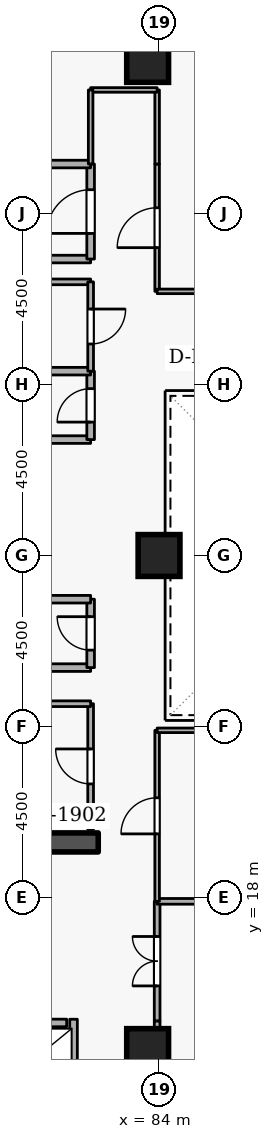
"""IFC4 building model, lengths in metres.
Left out: names, types, materials, properties, quantities, classifications, styles, units other than length and angle.
Written with IfcOpenShell. Run it as: python <this file> out.ifc"""

import sys

from ifc_helpers import new_model, si_unit, direction, frame, frame_2d, origin, origin_2d, place, context, subcontext, project, spatial, rectangle, extrude, element, fill, save


model = new_model("IFC4")
c1 = context("Model", 3, precision=1e-05, world=origin(), true_north=direction((0.0, 1.0)))
c2 = subcontext(c1, "Body", "Model", "MODEL_VIEW")
j1 = project(units=[si_unit("LENGTHUNIT", "METRE"), si_unit("PLANEANGLEUNIT", "RADIAN")], contexts=[c1])
p1 = place(None, origin())
s1 = spatial("IfcSite", under=j1, at=p1, CompositionType="ELEMENT")
p2 = place(p1, origin())
s2 = spatial("IfcBuilding", under=s1, at=p2, CompositionType="ELEMENT")
p3 = place(p2, frame((0.0, 0.0, 159.9)))
s3 = spatial("IfcBuildingStorey", under=s2, at=p3, CompositionType="ELEMENT", Elevation=159.9)
p4 = place(p3, frame((76.6, 19.45, 0.0), z_axis=(0.0, 0.0, 1.0), x_axis=(1.0, 0.0, 0.0)))
e1 = element("IfcWall", 1, at=p4, inside=s3, PredefinedType="SHEAR", context=c2, shape_type="SweptSolid", body=[
    extrude(rectangle(XDim=5.8, YDim=0.5, at=frame_2d((2.9, 0.0))), origin(), (0.0, 0.0, 1.0), 3.6),
])
for number, where, z_axis, x_axis in (
    (2, (83.7, 14.0, 0.0), (0.0, 0.0, 1.0), (1.0, 0.0, 0.0)),
    (3, (83.7, 40.0, 0.0), (0.0, 0.0, 1.0), (1.0, 0.0, 0.0)),
    (4, (84.0, 27.0, 0.0), (0.0, 0.0, 1.0), (1.0, 0.0, 0.0)),
):
    element("IfcColumn", number, at=place(p3, frame(where, z_axis=z_axis, x_axis=x_axis)), inside=s3, PredefinedType="COLUMN", context=c2, shape_type="SweptSolid", body=[
        extrude(rectangle(XDim=1.1, YDim=1.1, at=origin_2d()), origin(), (0.0, 0.0, 1.0), 3.6),
    ])
p5 = place(p3, frame((79.63, 14.7, 0.0), z_axis=(0.0, 0.0, 1.0), x_axis=(1.0, 0.0, 0.0)))
e5 = element("IfcWall", 5, at=p5, inside=s3, PredefinedType="STANDARD", context=c2, shape_type="SweptSolid", body=[
    extrude(rectangle(XDim=1.94, YDim=0.2, at=frame_2d((0.97, 0.0))), origin(), (0.0, 0.0, 1.0), 3.34),
])
p6 = place(p5, frame((0.46, 0.0, 0.0)))
e6 = element("IfcOpeningElement", 6, at=p6, cuts=e5, PredefinedType="OPENING", context=c2, shape_type="SweptSolid", body=[
    extrude(rectangle(XDim=1.02, YDim=2.06, at=frame_2d((0.51, 1.03))), frame((0.0, 0.11, 0.0), z_axis=(0.0, -1.0, 0.0), x_axis=(1.0, 0.0, 0.0)), (0.0, 0.0, 1.0), 0.22),
])
p7 = place(p3, frame((81.75, 12.612, 0.0), z_axis=(0.0, 0.0, 1.0), x_axis=(0.0, 1.0, 0.0)))
e7 = element("IfcWall", 7, at=p7, inside=s3, PredefinedType="STANDARD", context=c2, shape_type="SweptSolid", body=[
    extrude(rectangle(XDim=2.186, YDim=0.2, at=frame_2d((1.093, 0.0))), origin(), (0.0, 0.0, 1.0), 3.34),
])
p8 = place(p3, frame((79.9, 34.8, 0.0), z_axis=(0.0, 0.0, 1.0), x_axis=(1.0, 0.0, 0.0)))
e8 = element("IfcWall", 8, at=p8, inside=s3, PredefinedType="STANDARD", context=c2, shape_type="SweptSolid", body=[
    extrude(rectangle(XDim=2.3, YDim=0.2, at=frame_2d((1.15, 0.0))), origin(), (0.0, 0.0, 1.0), 2.545),
])
p9 = place(p3, frame((82.2, 34.8, 0.0), z_axis=(0.0, 0.0, 1.0), x_axis=(0.0, 1.0, 0.0)))
e9 = element("IfcWall", 9, at=p9, inside=s3, PredefinedType="STANDARD", context=c2, shape_type="SweptSolid", body=[
    extrude(rectangle(XDim=2.5, YDim=0.2, at=frame_2d((1.25, 0.0))), origin(), (0.0, 0.0, 1.0), 3.34),
])
p10 = place(p9, frame((0.675, 0.0, 0.0)))
e10 = element("IfcOpeningElement", 10, at=p10, cuts=e9, PredefinedType="OPENING", context=c2, shape_type="SweptSolid", body=[
    extrude(rectangle(XDim=1.15, YDim=2.1, at=frame_2d((0.575, 1.05))), frame((0.0, 0.11, 0.0), z_axis=(0.0, -1.0, 0.0), x_axis=(1.0, 0.0, 0.0)), (0.0, 0.0, 1.0), 0.22),
])
p11 = place(p3, frame((82.2, 37.3, 0.0), z_axis=(0.0, 0.0, 1.0), x_axis=(-1.0, 0.0, 0.0)))
e11 = element("IfcWall", 11, at=p11, inside=s3, PredefinedType="STANDARD", context=c2, shape_type="SweptSolid", body=[
    extrude(rectangle(XDim=5.7, YDim=0.2, at=frame_2d((2.85, 0.0))), origin(), (0.0, 0.0, 1.0), 3.34),
])
p12 = place(p3, frame((80.15, 24.05, 0.0), z_axis=(0.0, 0.0, 1.0), x_axis=(1.0, 0.0, 0.0)))
e12 = element("IfcWall", 12, at=p12, inside=s3, PredefinedType="STANDARD", context=c2, shape_type="SweptSolid", body=[
    extrude(rectangle(XDim=2.05, YDim=0.2, at=frame_2d((1.025, 0.0))), origin(), (0.0, 0.0, 1.0), 3.34),
])
p13 = place(p3, frame((82.2, 24.05, 0.0), z_axis=(0.0, 0.0, 1.0), x_axis=(0.0, 1.0, 0.0)))
e13 = element("IfcWall", 13, at=p13, inside=s3, PredefinedType="STANDARD", context=c2, shape_type="SweptSolid", body=[
    extrude(rectangle(XDim=1.8, YDim=0.2, at=frame_2d((0.9, 0.0))), origin(), (0.0, 0.0, 1.0), 3.34),
])
p14 = place(p13, frame((0.46, 0.0, 0.0)))
e14 = element("IfcOpeningElement", 14, at=p14, cuts=e13, PredefinedType="OPENING", context=c2, shape_type="SweptSolid", body=[
    extrude(rectangle(XDim=0.88, YDim=2.04, at=frame_2d((0.44, 1.02))), frame((0.0, 0.11, 0.0), z_axis=(0.0, -1.0, 0.0), x_axis=(1.0, 0.0, 0.0)), (0.0, 0.0, 1.0), 0.22),
])
for number, where, z_axis, x_axis in (
    (15, (82.2, 25.85, 0.0), (0.0, 0.0, 1.0), (-1.0, 0.0, 0.0)),
    (16, (80.15, 30.05, 0.0), (0.0, 0.0, 1.0), (1.0, 0.0, 0.0)),
):
    element("IfcWall", number, at=place(p3, frame(where, z_axis=z_axis, x_axis=x_axis)), inside=s3, PredefinedType="STANDARD", context=c2, shape_type="SweptSolid", body=[
        extrude(rectangle(XDim=2.05, YDim=0.2, at=frame_2d((1.025, 0.0))), origin(), (0.0, 0.0, 1.0), 3.34),
    ])
p15 = place(p3, frame((82.2, 30.05, 0.0), z_axis=(0.0, 0.0, 1.0), x_axis=(0.0, 1.0, 0.0)))
e17 = element("IfcWall", 17, at=p15, inside=s3, PredefinedType="STANDARD", context=c2, shape_type="SweptSolid", body=[
    extrude(rectangle(XDim=1.8, YDim=0.2, at=frame_2d((0.9, 0.0))), origin(), (0.0, 0.0, 1.0), 3.34),
])
p16 = place(p15, frame((0.46, 0.0, 0.0)))
e18 = element("IfcOpeningElement", 18, at=p16, cuts=e17, PredefinedType="OPENING", context=c2, shape_type="SweptSolid", body=[
    extrude(rectangle(XDim=0.88, YDim=2.04, at=frame_2d((0.44, 1.02))), frame((0.0, 0.11, 0.0), z_axis=(0.0, -1.0, 0.0), x_axis=(1.0, 0.0, 0.0)), (0.0, 0.0, 1.0), 0.22),
])
p17 = place(p3, frame((82.2, 31.85, 0.0), z_axis=(0.0, 0.0, 1.0), x_axis=(-1.0, 0.0, 0.0)))
e19 = element("IfcWall", 19, at=p17, inside=s3, PredefinedType="STANDARD", context=c2, shape_type="SweptSolid", body=[
    extrude(rectangle(XDim=2.05, YDim=0.2, at=frame_2d((1.025, 0.0))), origin(), (0.0, 0.0, 1.0), 3.34),
])
p18 = place(p3, frame((82.2, 19.8, 0.0), z_axis=(0.0, 0.0, 1.0), x_axis=(0.0, 1.0, 0.0)))
e20 = element("IfcWall", 20, at=p18, inside=s3, PredefinedType="PARTITIONING", context=c2, shape_type="SweptSolid", body=[
    extrude(rectangle(XDim=3.3, YDim=0.15, at=frame_2d((1.65, 0.0))), origin(), (0.0, 0.0, 1.0), 3.34),
])
p19 = place(p18, frame((1.19, 0.0, 0.0)))
e21 = element("IfcOpeningElement", 21, at=p19, cuts=e20, PredefinedType="OPENING", context=c2, shape_type="SweptSolid", body=[
    extrude(rectangle(XDim=0.92, YDim=2.08, at=frame_2d((0.46, 1.04))), frame((0.0, 0.085, 0.0), z_axis=(0.0, -1.0, 0.0), x_axis=(1.0, 0.0, 0.0)), (0.0, 0.0, 1.0), 0.17),
])
p20 = place(p3, frame((82.2, 23.1, 0.0), z_axis=(0.0, 0.0, 1.0), x_axis=(-1.0, 0.0, 0.0)))
e22 = element("IfcWall", 22, at=p20, inside=s3, PredefinedType="PARTITIONING", context=c2, shape_type="SweptSolid", body=[
    extrude(rectangle(XDim=2.05, YDim=0.15, at=frame_2d((1.025, 0.0))), origin(), (0.0, 0.0, 1.0), 3.34),
])
p21 = place(p3, frame((80.15, 34.2, 0.0), z_axis=(0.0, 0.0, 1.0), x_axis=(1.0, 0.0, 0.0)))
e23 = element("IfcWall", 23, at=p21, inside=s3, PredefinedType="PARTITIONING", context=c2, shape_type="SweptSolid", body=[
    extrude(rectangle(XDim=2.05, YDim=0.15, at=frame_2d((1.025, 0.0))), origin(), (0.0, 0.0, 1.0), 2.545),
])
p22 = place(p3, frame((82.2, 34.2, 0.0), z_axis=(0.0, 0.0, 1.0), x_axis=(0.0, -1.0, 0.0)))
e24 = element("IfcWall", 24, at=p22, inside=s3, PredefinedType="PARTITIONING", context=c2, shape_type="SweptSolid", body=[
    extrude(rectangle(XDim=2.35, YDim=0.15, at=frame_2d((1.175, 0.0))), origin(), (0.0, 0.0, 1.0), 3.34),
])
p23 = place(p22, frame((0.715, 0.0, 0.0)))
e25 = element("IfcOpeningElement", 25, at=p23, cuts=e24, PredefinedType="OPENING", context=c2, shape_type="SweptSolid", body=[
    extrude(rectangle(XDim=0.92, YDim=2.08, at=frame_2d((0.46, 1.04))), frame((0.0, 0.085, 0.0), z_axis=(0.0, -1.0, 0.0), x_axis=(1.0, 0.0, 0.0)), (0.0, 0.0, 1.0), 0.17),
])
p24 = place(p3, frame((83.95, 14.75, 0.0), z_axis=(0.0, 0.0, 1.0), x_axis=(0.0, 1.0, 0.0)))
e26 = element("IfcWall", 26, at=p24, inside=s3, PredefinedType="PARTITIONING", context=c2, shape_type="SweptSolid", body=[
    extrude(rectangle(XDim=3.15, YDim=0.15, at=frame_2d((1.575, 0.0))), origin(), (0.0, 0.0, 1.0), 3.34),
])
p25 = place(p24, frame((0.925, 0.0, 0.0)))
e27 = element("IfcOpeningElement", 27, at=p25, cuts=e26, PredefinedType="OPENING", context=c2, shape_type="SweptSolid", body=[
    extrude(rectangle(XDim=1.3, YDim=2.12, at=frame_2d((0.65, 1.06))), frame((0.0, 0.085, 0.0), z_axis=(0.0, -1.0, 0.0), x_axis=(1.0, 0.0, 0.0)), (0.0, 0.0, 1.0), 0.17),
])
p26 = place(p3, frame((83.95, 17.9, 0.0), z_axis=(0.0, 0.0, 1.0), x_axis=(1.0, 0.0, 0.0)))
e28 = element("IfcWall", 28, at=p26, inside=s3, PredefinedType="PARTITIONING", context=c2, shape_type="SweptSolid", body=[
    extrude(rectangle(XDim=4.55, YDim=0.15, at=frame_2d((2.275, 0.0))), origin(), (0.0, 0.0, 1.0), 3.34),
])
p27 = place(p3, frame((83.95, 12.4, 0.0), z_axis=(0.0, 0.0, 1.0), x_axis=(0.0, 1.0, 0.0)))
e29 = element("IfcWall", 29, at=p27, inside=s3, PredefinedType="PARTITIONING", context=c2, shape_type="SweptSolid", body=[
    extrude(rectangle(XDim=2.35, YDim=0.15, at=frame_2d((1.175, 0.0))), origin(), (0.0, 0.0, 1.0), 3.34),
])
p28 = place(p3, frame((83.95, 17.9, 0.0), z_axis=(0.0, 0.0, 1.0), x_axis=(0.0, 1.0, 0.0)))
e30 = element("IfcWall", 30, at=p28, inside=s3, PredefinedType="PARTITIONING", context=c2, shape_type="SweptSolid", body=[
    extrude(rectangle(XDim=4.5, YDim=0.12, at=frame_2d((2.25, 0.0))), origin(), (0.0, 0.0, 1.0), 3.34),
])
p29 = place(p28, frame((1.775, 0.0, 0.0)))
e31 = element("IfcOpeningElement", 31, at=p29, cuts=e30, PredefinedType="OPENING", context=c2, shape_type="SweptSolid", body=[
    extrude(rectangle(XDim=0.95, YDim=2.1, at=frame_2d((0.475, 1.05))), frame((0.0, 0.07, 0.0), z_axis=(0.0, -1.0, 0.0), x_axis=(1.0, 0.0, 0.0)), (0.0, 0.0, 1.0), 0.14),
])
p30 = place(p3, frame((83.95, 22.4, 0.0), z_axis=(0.0, 0.0, 1.0), x_axis=(1.0, 0.0, 0.0)))
e32 = element("IfcWall", 32, at=p30, inside=s3, PredefinedType="PARTITIONING", context=c2, shape_type="SweptSolid", body=[
    extrude(rectangle(XDim=9.1, YDim=0.12, at=frame_2d((4.55, 0.0))), origin(), (0.0, 0.0, 1.0), 3.34),
])
p31 = place(p3, frame((83.95, 33.95, 0.0), z_axis=(0.0, 0.0, 1.0), x_axis=(0.0, 1.0, 0.0)))
e33 = element("IfcWall", 33, at=p31, inside=s3, PredefinedType="PARTITIONING", context=c2, shape_type="SweptSolid", body=[
    extrude(rectangle(XDim=3.35, YDim=0.12, at=frame_2d((1.675, 0.0))), origin(), (0.0, 0.0, 1.0), 3.34),
])
p32 = place(p31, frame((1.15, 0.0, 0.0)))
e34 = element("IfcOpeningElement", 34, at=p32, cuts=e33, PredefinedType="OPENING", context=c2, shape_type="SweptSolid", body=[
    extrude(rectangle(XDim=1.05, YDim=2.1, at=frame_2d((0.525, 1.05))), frame((0.0, 0.07, 0.0), z_axis=(0.0, -1.0, 0.0), x_axis=(1.0, 0.0, 0.0)), (0.0, 0.0, 1.0), 0.14),
])
p33 = place(p3, frame((83.95, 37.3, 0.0), z_axis=(0.0, 0.0, 1.0), x_axis=(0.0, 1.0, 0.0)))
e35 = element("IfcWall", 35, at=p33, inside=s3, PredefinedType="PARTITIONING", context=c2, shape_type="SweptSolid", body=[
    extrude(rectangle(XDim=1.95, YDim=0.12, at=frame_2d((0.975, 0.0))), origin(), (0.0, 0.0, 1.0), 3.34),
])
p34 = place(p3, frame((83.95, 39.25, 0.0), z_axis=(0.0, 0.0, 1.0), x_axis=(-1.0, 0.0, 0.0)))
e36 = element("IfcWall", 36, at=p34, inside=s3, PredefinedType="PARTITIONING", context=c2, shape_type="SweptSolid", body=[
    extrude(rectangle(XDim=1.75, YDim=0.12, at=frame_2d((0.875, 0.0))), origin(), (0.0, 0.0, 1.0), 3.34),
])
p35 = place(p3, frame((82.2, 39.25, 0.0), z_axis=(0.0, 0.0, 1.0), x_axis=(0.0, -1.0, 0.0)))
e37 = element("IfcWall", 37, at=p35, inside=s3, PredefinedType="PARTITIONING", context=c2, shape_type="SweptSolid", body=[
    extrude(rectangle(XDim=1.95, YDim=0.12, at=frame_2d((0.975, 0.0))), origin(), (0.0, 0.0, 1.0), 3.34),
])
p36 = place(p3, frame((86.25, 33.95, 0.0), z_axis=(0.0, 0.0, 1.0), x_axis=(-1.0, 0.0, 0.0)))
e38 = element("IfcWall", 38, at=p36, inside=s3, PredefinedType="PARTITIONING", context=c2, shape_type="SweptSolid", body=[
    extrude(rectangle(XDim=2.3, YDim=0.12, at=frame_2d((1.15, 0.0))), origin(), (0.0, 0.0, 1.0), 3.34),
])
p37 = place(p10, origin())
e39 = element("IfcDoor", 39, at=p37, inside=s3, OperationType="SINGLE_SWING_LEFT", PredefinedType="DOOR", context=c2, shape_type="SweptSolid", body=[
    extrude(rectangle(XDim=1.15, YDim=2.1, at=frame_2d((0.575, 1.05))), frame((0.0, 0.025, 0.0), z_axis=(0.0, -1.0, 0.0), x_axis=(1.0, 0.0, 0.0)), (0.0, 0.0, 1.0), 0.05),
])
fill(e10, e39)
p38 = place(p14, origin())
e40 = element("IfcDoor", 40, at=p38, inside=s3, OperationType="SINGLE_SWING_RIGHT", PredefinedType="DOOR", context=c2, shape_type="SweptSolid", body=[
    extrude(rectangle(XDim=0.88, YDim=2.04, at=frame_2d((0.44, 1.02))), frame((0.0, 0.025, 0.0), z_axis=(0.0, -1.0, 0.0), x_axis=(1.0, 0.0, 0.0)), (0.0, 0.0, 1.0), 0.05),
])
fill(e14, e40)
p39 = place(p16, origin())
e41 = element("IfcDoor", 41, at=p39, inside=s3, OperationType="SINGLE_SWING_LEFT", PredefinedType="DOOR", context=c2, shape_type="SweptSolid", body=[
    extrude(rectangle(XDim=0.88, YDim=2.04, at=frame_2d((0.44, 1.02))), frame((0.0, 0.025, 0.0), z_axis=(0.0, -1.0, 0.0), x_axis=(1.0, 0.0, 0.0)), (0.0, 0.0, 1.0), 0.05),
])
fill(e18, e41)
p40 = place(p19, origin())
e42 = element("IfcDoor", 42, at=p40, inside=s3, OperationType="SINGLE_SWING_RIGHT", PredefinedType="DOOR", context=c2, shape_type="SweptSolid", body=[
    extrude(rectangle(XDim=0.92, YDim=2.08, at=frame_2d((0.46, 1.04))), frame((0.0, 0.025, 0.0), z_axis=(0.0, -1.0, 0.0), x_axis=(1.0, 0.0, 0.0)), (0.0, 0.0, 1.0), 0.05),
])
fill(e21, e42)
p41 = place(p23, origin())
e43 = element("IfcDoor", 43, at=p41, inside=s3, OperationType="SINGLE_SWING_LEFT", PredefinedType="DOOR", context=c2, shape_type="SweptSolid", body=[
    extrude(rectangle(XDim=0.92, YDim=2.08, at=frame_2d((0.46, 1.04))), frame((0.0, 0.025, 0.0), z_axis=(0.0, -1.0, 0.0), x_axis=(1.0, 0.0, 0.0)), (0.0, 0.0, 1.0), 0.05),
])
fill(e25, e43)
p42 = place(p25, origin())
e44 = element("IfcDoor", 44, at=p42, inside=s3, OperationType="DOUBLE_DOOR_SINGLE_SWING", PredefinedType="DOOR", context=c2, shape_type="SweptSolid", body=[
    extrude(rectangle(XDim=1.3, YDim=2.12, at=frame_2d((0.65, 1.06))), frame((0.0, 0.025, 0.0), z_axis=(0.0, -1.0, 0.0), x_axis=(1.0, 0.0, 0.0)), (0.0, 0.0, 1.0), 0.05),
])
fill(e27, e44)
p43 = place(p29, origin())
e45 = element("IfcDoor", 45, at=p43, inside=s3, OperationType="SINGLE_SWING_LEFT", PredefinedType="DOOR", context=c2, shape_type="SweptSolid", body=[
    extrude(rectangle(XDim=0.95, YDim=2.1, at=frame_2d((0.475, 1.05))), frame((0.0, 0.025, 0.0), z_axis=(0.0, -1.0, 0.0), x_axis=(1.0, 0.0, 0.0)), (0.0, 0.0, 1.0), 0.05),
])
fill(e31, e45)
p44 = place(p32, origin())
e46 = element("IfcDoor", 46, at=p44, inside=s3, OperationType="SINGLE_SWING_LEFT", PredefinedType="DOOR", context=c2, shape_type="SweptSolid", body=[
    extrude(rectangle(XDim=1.05, YDim=2.1, at=frame_2d((0.525, 1.05))), frame((0.0, 0.025, 0.0), z_axis=(0.0, -1.0, 0.0), x_axis=(1.0, 0.0, 0.0)), (0.0, 0.0, 1.0), 0.05),
])
fill(e34, e46)
save(model, sys.argv[1])
